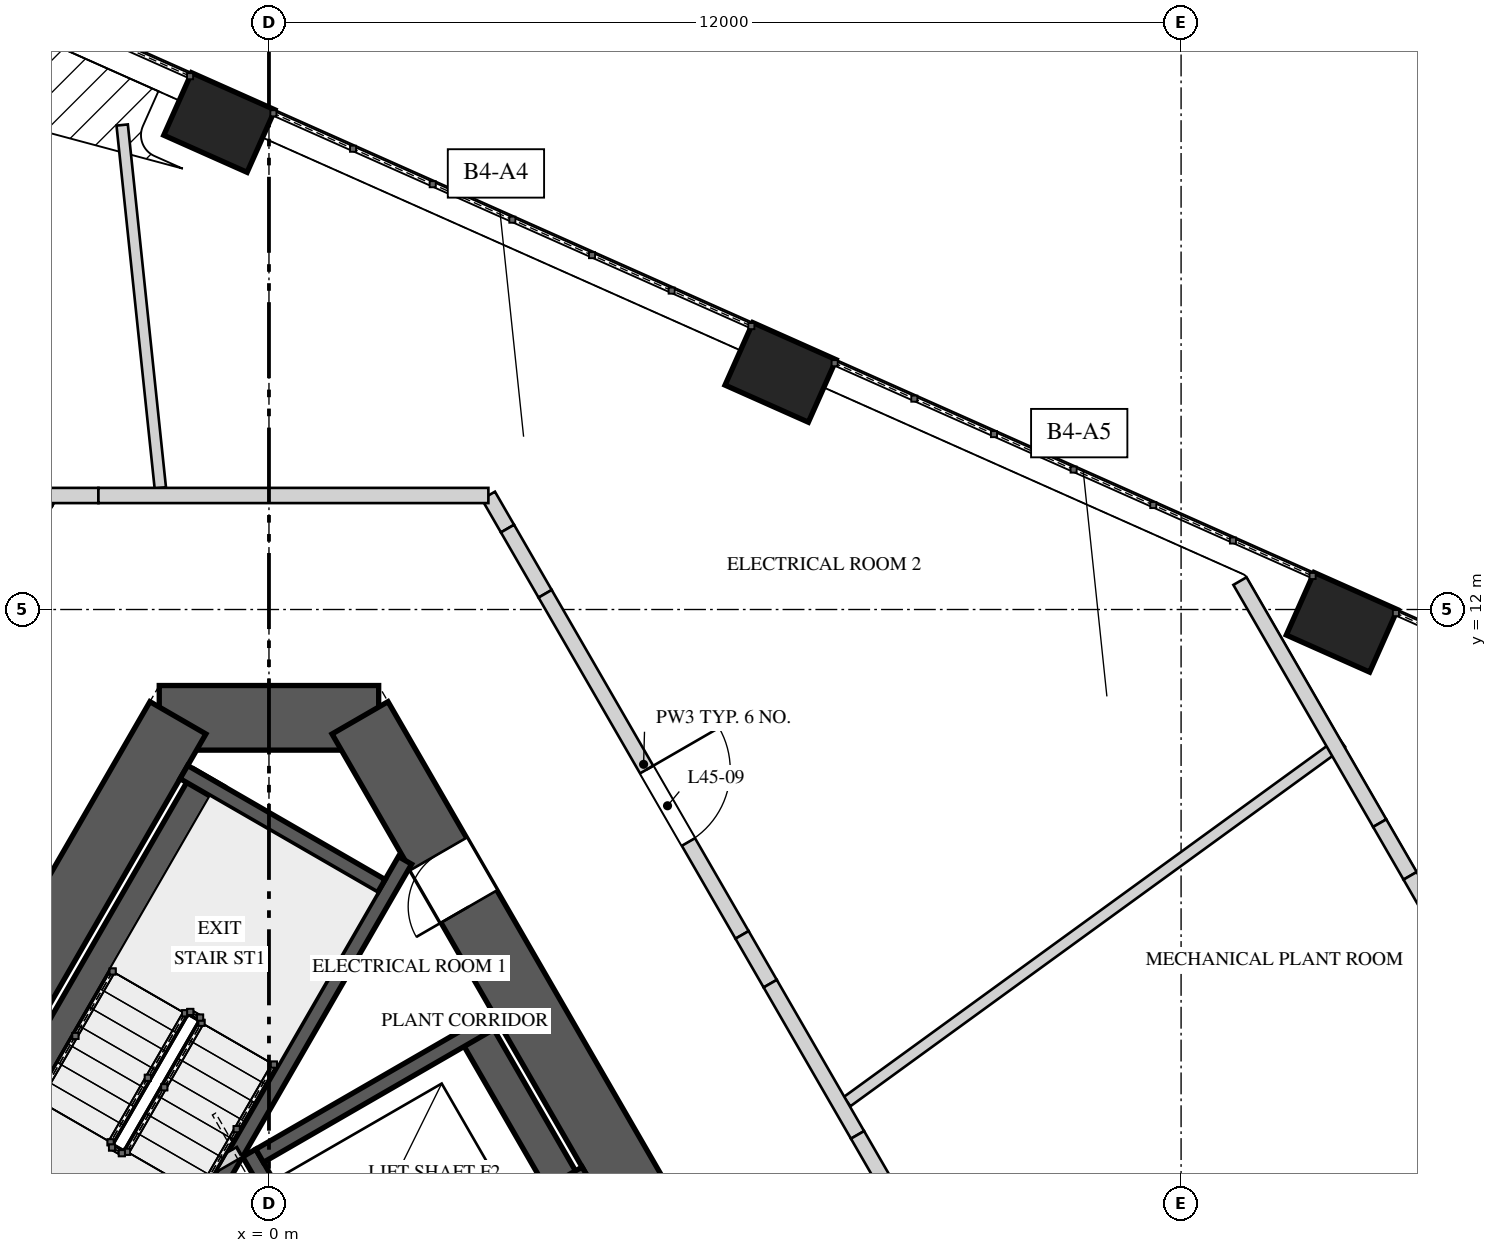
"""IFC4 building model, lengths in metres.
Left out: names, types, materials, properties, quantities, classifications, styles, units other than length and angle.
Written with IfcOpenShell. Run it as: python <this file> out.ifc"""

import sys

from ifc_helpers import new_model, si_unit, direction, frame, frame_2d, origin, origin_2d, place, context, subcontext, project, spatial, rectangle, extrude, element, fill, save


model = new_model("IFC4")
c1 = context("Model", 3, precision=1e-05, world=origin(), true_north=direction((0.0, 1.0)))
c2 = subcontext(c1, "Body", "Model", "MODEL_VIEW")
j1 = project(units=[si_unit("LENGTHUNIT", "METRE"), si_unit("PLANEANGLEUNIT", "RADIAN")], contexts=[c1])
p1 = place(None, origin())
s1 = spatial("IfcSite", under=j1, at=p1, CompositionType="ELEMENT")
p2 = place(p1, origin())
s2 = spatial("IfcBuilding", under=s1, at=p2, CompositionType="ELEMENT")
p3 = place(p2, frame((0.0, 0.0, 194.8)))
s3 = spatial("IfcBuildingStorey", under=s2, at=p3, CompositionType="ELEMENT", Elevation=194.8)
p4 = place(p3, frame((1.443, 10.575, 0.0), z_axis=(0.0, 0.0, 1.0), x_axis=(-1.0, 0.0, 0.0)))
e1 = element("IfcWall", 1, at=p4, inside=s3, PredefinedType="SHEAR", context=c2, shape_type="SweptSolid", body=[
    extrude(rectangle(XDim=2.887, YDim=0.85, at=frame_2d((1.443, 0.0))), origin(), (0.0, 0.0, 1.0), 5.2),
])
p5 = place(p3, frame((-1.198, 10.575, 0.0), z_axis=(0.0, 0.0, 1.0), x_axis=(-0.499995289315, -0.866028123483, 0.0)))
e2 = element("IfcWall", 2, at=p5, inside=s3, PredefinedType="SHEAR", context=c2, shape_type="SweptSolid", body=[
    extrude(rectangle(XDim=17.118, YDim=0.85, at=frame_2d((8.559, 0.0))), origin(), (0.0, 0.0, 1.0), 5.2),
])
p6 = place(p5, frame((6.764, 0.0, 0.0)))
e3 = element("IfcOpeningElement", 3, at=p6, cuts=e2, PredefinedType="OPENING", context=c2, shape_type="SweptSolid", body=[
    extrude(rectangle(XDim=1.0, YDim=2.4, at=frame_2d((0.5, 1.2))), frame((0.0, 0.435, 0.0), z_axis=(0.0, -1.0, 0.0), x_axis=(1.0, 0.0, 0.0)), (0.0, 0.0, 1.0), 0.87),
])
p7 = place(p3, frame((9.757, -4.25, 0.0), z_axis=(0.0, 0.0, 1.0), x_axis=(-0.499995289315, 0.866028123483, 0.0)))
e4 = element("IfcWall", 4, at=p7, inside=s3, PredefinedType="SHEAR", context=c2, shape_type="SweptSolid", body=[
    extrude(rectangle(XDim=17.118, YDim=0.85, at=frame_2d((8.559, 0.0))), origin(), (0.0, 0.0, 1.0), 5.2),
])
p8 = place(p7, frame((6.834, 0.0, 0.0)))
e5 = element("IfcOpeningElement", 5, at=p8, cuts=e4, PredefinedType="OPENING", context=c2, shape_type="SweptSolid", body=[
    extrude(rectangle(XDim=1.0, YDim=2.4, at=frame_2d((0.5, 1.2))), frame((0.0, 0.435, 0.0), z_axis=(0.0, -1.0, 0.0), x_axis=(1.0, 0.0, 0.0)), (0.0, 0.0, 1.0), 0.87),
])
p9 = place(p7, frame((14.252, 0.0, 0.0)))
e6 = element("IfcOpeningElement", 6, at=p9, cuts=e4, PredefinedType="OPENING", context=c2, shape_type="SweptSolid", body=[
    extrude(rectangle(XDim=0.8, YDim=2.1, at=frame_2d((0.4, 1.05))), frame((0.0, 0.435, 0.0), z_axis=(0.0, -1.0, 0.0), x_axis=(1.0, 0.0, 0.0)), (0.0, 0.0, 1.0), 0.87),
])
for number, where, z_axis, x_axis in (
    (7, (14.115, 11.832, 0.0), (0.0, 0.0, 1.0), (-0.914, 0.407, 0.0)),
    (8, (6.731, 15.119, 0.0), (0.0, 0.0, 1.0), (-0.914, 0.407, 0.0)),
    (9, (-0.653, 18.407, 0.0), (0.0, 0.0, 1.0), (-0.914, 0.407, 0.0)),
):
    element("IfcColumn", number, at=place(p3, frame(where, z_axis=z_axis, x_axis=x_axis)), inside=s3, PredefinedType="COLUMN", context=c2, shape_type="SweptSolid", body=[
        extrude(rectangle(XDim=1.2, YDim=0.9, at=origin_2d()), origin(), (0.0, 0.0, 1.0), 2.835),
    ])
p10 = place(p3, frame((-0.788, 9.785, 0.0), z_axis=(0.0, 0.0, 1.0), x_axis=(-0.500009909098, -0.866019682689, 0.0)))
e10 = element("IfcWall", 10, at=p10, inside=s3, PredefinedType="SOLIDWALL", context=c2, shape_type="SweptSolid", body=[
    extrude(rectangle(XDim=6.2, YDim=0.45, at=frame_2d((3.1, 0.0))), origin(), (0.0, 0.0, 1.0), 4.85),
])
p11 = place(p3, frame((1.79, 8.7, 0.0), z_axis=(0.0, 0.0, 1.0), x_axis=(-0.499999959354, -0.866025427251, 0.0)))
e11 = element("IfcWall", 11, at=p11, inside=s3, PredefinedType="SOLIDWALL", context=c2, shape_type="SweptSolid", body=[
    extrude(rectangle(XDim=6.549, YDim=0.2, at=frame_2d((3.275, 0.0))), origin(), (0.0, 0.0, 1.0), 4.85),
])
p12 = place(p3, frame((1.479, 8.361, 0.0), z_axis=(0.0, 0.0, 1.0), x_axis=(-0.866031096941, 0.499990139034, 0.0)))
e12 = element("IfcWall", 12, at=p12, inside=s3, PredefinedType="SOLIDWALL", context=c2, shape_type="SweptSolid", body=[
    extrude(rectangle(XDim=3.0, YDim=0.2, at=frame_2d((1.5, 0.0))), origin(), (0.0, 0.0, 1.0), 4.85),
])
p13 = place(p3, frame((-1.521, 3.165, 0.0), z_axis=(0.0, 0.0, 1.0), x_axis=(-0.866031096941, 0.499990139034, 0.0)))
e13 = element("IfcWall", 13, at=p13, inside=s3, PredefinedType="SOLIDWALL", context=c2, shape_type="SweptSolid", body=[
    extrude(rectangle(XDim=3.0, YDim=0.2, at=frame_2d((1.5, 0.0))), origin(), (0.0, 0.0, 1.0), 4.85),
])
p14 = place(p13, frame((0.725, 0.0, 0.0)))
e14 = element("IfcOpeningElement", 14, at=p14, cuts=e13, PredefinedType="OPENING", context=c2, shape_type="SweptSolid", body=[
    extrude(rectangle(XDim=1.1, YDim=2.4, at=frame_2d((0.55, 1.2))), frame((0.0, 0.11, 0.0), z_axis=(0.0, -1.0, 0.0), x_axis=(1.0, 0.0, 0.0)), (0.0, 0.0, 1.0), 0.22),
])
p15 = place(p3, frame((2.19, 0.606, 0.0), z_axis=(0.0, 0.0, 1.0), x_axis=(-0.500002801628, 0.866023786258, 0.0)))
e15 = element("IfcWall", 15, at=p15, inside=s3, PredefinedType="SOLIDWALL", context=c2, shape_type="SweptSolid", body=[
    extrude(rectangle(XDim=4.9, YDim=0.2, at=frame_2d((2.45, 0.0))), origin(), (0.0, 0.0, 1.0), 4.85),
])
p16 = place(p15, frame((0.625, 0.0, 0.0)))
e16 = element("IfcOpeningElement", 16, at=p16, cuts=e15, PredefinedType="OPENING", context=c2, shape_type="SweptSolid", body=[
    extrude(rectangle(XDim=1.3, YDim=2.1, at=frame_2d((0.65, 1.05))), frame((0.0, 0.11, 0.0), z_axis=(0.0, -1.0, 0.0), x_axis=(1.0, 0.0, 0.0)), (0.0, 0.0, 1.0), 0.22),
])
p17 = place(p15, frame((2.975, 0.0, 0.0)))
e17 = element("IfcOpeningElement", 17, at=p17, cuts=e15, PredefinedType="OPENING", context=c2, shape_type="SweptSolid", body=[
    extrude(rectangle(XDim=1.3, YDim=2.1, at=frame_2d((0.65, 1.05))), frame((0.0, 0.11, 0.0), z_axis=(0.0, -1.0, 0.0), x_axis=(1.0, 0.0, 0.0)), (0.0, 0.0, 1.0), 0.22),
])
p18 = place(p3, frame((5.113, 2.294, 0.0), z_axis=(0.0, 0.0, 1.0), x_axis=(-0.500002801628, 0.866023786258, 0.0)))
e18 = element("IfcWall", 18, at=p18, inside=s3, PredefinedType="SOLIDWALL", context=c2, shape_type="SweptSolid", body=[
    extrude(rectangle(XDim=4.9, YDim=0.45, at=frame_2d((2.45, 0.0))), origin(), (0.0, 0.0, 1.0), 4.85),
])
for number, where, z_axis, x_axis in (
    (19, (1.052, 2.778, 0.0), (0.0, 0.0, 1.0), (0.866, 0.5, 0.0)),
    (20, (-0.123, 4.813, 0.0), (0.0, 0.0, 1.0), (0.866, 0.5, 0.0)),
):
    element("IfcWall", number, at=place(p3, frame(where, z_axis=z_axis, x_axis=x_axis)), inside=s3, PredefinedType="SOLIDWALL", context=c2, shape_type="SweptSolid", body=[
        extrude(rectangle(XDim=3.6, YDim=0.2, at=frame_2d((1.8, 0.0))), origin(), (0.0, 0.0, 1.0), 4.85),
    ])
p19 = place(p3, frame((-1.51, 4.215, 0.0), z_axis=(0.0, 0.0, 1.0), x_axis=(0.866085525409, 0.49989585183, 0.0)))
e21 = element("IfcWall", 21, at=p19, inside=s3, PredefinedType="PARTITIONING", context=c2, shape_type="SweptSolid", body=[
    extrude(rectangle(XDim=1.3, YDim=0.15, at=frame_2d((0.65, 0.0))), origin(), (0.0, 0.0, 1.0), 4.85),
])
p20 = place(p3, frame((-1.931, 18.374, 0.0), z_axis=(0.0, 0.0, 1.0), x_axis=(0.104517989015, -0.994522996201, 0.0)))
e22 = element("IfcWall", 22, at=p20, inside=s3, PredefinedType="PARTITIONING", context=c2, shape_type="SweptSolid", body=[
    extrude(rectangle(XDim=4.8, YDim=0.15, at=frame_2d((2.4, 0.0))), origin(), (0.0, 0.0, 1.0), 4.85),
])
p21 = place(p3, frame((7.606, 5.526, 0.0), z_axis=(0.0, 0.0, 1.0), x_axis=(0.809027351465, 0.587770996717, 0.0)))
e23 = element("IfcWall", 23, at=p21, inside=s3, PredefinedType="PARTITIONING", context=c2, shape_type="SweptSolid", body=[
    extrude(rectangle(XDim=8.044, YDim=0.15, at=frame_2d((4.022, 0.0))), origin(), (0.0, 0.0, 1.0), 4.85),
])
p22 = place(p3, frame((2.887, 13.5, 0.0), z_axis=(0.0, 0.0, 1.0), x_axis=(0.500002592159, -0.866023907196, 0.0)))
e24 = element("IfcWall", 24, at=p22, inside=s3, PredefinedType="SOLIDWALL", context=c2, shape_type="SweptSolid", body=[
    extrude(rectangle(XDim=0.503, YDim=0.2, at=frame_2d((0.251, 0.0))), origin(), (0.0, 0.0, 1.0), 4.85),
])
p23 = place(p3, frame((3.138, 13.064, 0.0), z_axis=(0.0, 0.0, 1.0), x_axis=(0.500063959222, -0.865988473761, 0.0)))
e25 = element("IfcWall", 25, at=p23, inside=s3, PredefinedType="SOLIDWALL", context=c2, shape_type="SweptSolid", body=[
    extrude(rectangle(XDim=0.99, YDim=0.2, at=frame_2d((0.495, 0.0))), origin(), (0.0, 0.0, 1.0), 4.15),
])
p24 = place(p3, frame((3.633, 12.207, 0.0), z_axis=(0.0, 0.0, 1.0), x_axis=(0.499990271856, -0.866031020258, 0.0)))
e26 = element("IfcWall", 26, at=p24, inside=s3, PredefinedType="SOLIDWALL", context=c2, shape_type="SweptSolid", body=[
    extrude(rectangle(XDim=5.182, YDim=0.2, at=frame_2d((2.591, 0.0))), origin(), (0.0, 0.0, 1.0), 4.85),
])
p25 = place(p24, frame((2.671, 0.0, 0.0)))
e27 = element("IfcOpeningElement", 27, at=p25, cuts=e26, PredefinedType="OPENING", context=c2, shape_type="SweptSolid", body=[
    extrude(rectangle(XDim=1.1, YDim=2.2, at=frame_2d((0.55, 1.1))), frame((0.0, 0.11, 0.0), z_axis=(0.0, -1.0, 0.0), x_axis=(1.0, 0.0, 0.0)), (0.0, 0.0, 1.0), 0.22),
])
p26 = place(p3, frame((6.224, 7.719, 0.0), z_axis=(0.0, 0.0, 1.0), x_axis=(0.499931655587, -0.866064858854, 0.0)))
e28 = element("IfcWall", 28, at=p26, inside=s3, PredefinedType="SOLIDWALL", context=c2, shape_type="SweptSolid", body=[
    extrude(rectangle(XDim=0.741, YDim=0.2, at=frame_2d((0.37, 0.0))), origin(), (0.0, 0.0, 1.0), 4.15),
])
p27 = place(p3, frame((6.594, 7.078, 0.0), z_axis=(0.0, 0.0, 1.0), x_axis=(0.500013761451, -0.866017458461, 0.0)))
e29 = element("IfcWall", 29, at=p27, inside=s3, PredefinedType="SOLIDWALL", context=c2, shape_type="SweptSolid", body=[
    extrude(rectangle(XDim=2.297, YDim=0.2, at=frame_2d((1.149, 0.0))), origin(), (0.0, 0.0, 1.0), 4.85),
])
p28 = place(p3, frame((7.743, 5.088, 0.0), z_axis=(0.0, 0.0, 1.0), x_axis=(0.500109828528, -0.865961984968, 0.0)))
e30 = element("IfcWall", 30, at=p28, inside=s3, PredefinedType="SOLIDWALL", context=c2, shape_type="SweptSolid", body=[
    extrude(rectangle(XDim=0.8, YDim=0.2, at=frame_2d((0.4, 0.0))), origin(), (0.0, 0.0, 1.0), 3.95),
])
p29 = place(p3, frame((-2.939, 13.409, 0.0), z_axis=(0.0, 0.0, 1.0), x_axis=(0.500393920955, 0.865797853931, 0.0)))
e31 = element("IfcWall", 31, at=p29, inside=s3, PredefinedType="SOLIDWALL", context=c2, shape_type="SweptSolid", body=[
    extrude(rectangle(XDim=0.105, YDim=0.2, at=frame_2d((0.052, 0.0))), origin(), (0.0, 0.0, 1.0), 4.15),
])
p30 = place(p3, frame((-2.887, 13.5, 0.0), z_axis=(0.0, 0.0, 1.0), x_axis=(1.0, 0.0, 0.0)))
e32 = element("IfcWall", 32, at=p30, inside=s3, PredefinedType="SOLIDWALL", context=c2, shape_type="SweptSolid", body=[
    extrude(rectangle(XDim=0.643, YDim=0.2, at=frame_2d((0.321, 0.0))), origin(), (0.0, 0.0, 1.0), 4.15),
])
p31 = place(p3, frame((-2.244, 13.5, 0.0), z_axis=(0.0, 0.0, 1.0), x_axis=(1.0, 0.0, 0.0)))
e33 = element("IfcWall", 33, at=p31, inside=s3, PredefinedType="SOLIDWALL", context=c2, shape_type="SweptSolid", body=[
    extrude(rectangle(XDim=5.131, YDim=0.2, at=frame_2d((2.565, 0.0))), origin(), (0.0, 0.0, 1.0), 4.85),
])
p32 = place(p3, frame((12.774, 12.374, 0.0), z_axis=(0.0, 0.0, 1.0), x_axis=(0.500002145574, -0.866024165033, 0.0)))
e34 = element("IfcWall", 34, at=p32, inside=s3, PredefinedType="SOLIDWALL", context=c2, shape_type="SweptSolid", body=[
    extrude(rectangle(XDim=3.677, YDim=0.2, at=frame_2d((1.839, 0.0))), origin(), (0.0, 0.0, 1.0), 4.85),
])
p33 = place(p3, frame((14.613, 9.189, 0.0), z_axis=(0.0, 0.0, 1.0), x_axis=(0.500109828528, -0.865961984968, 0.0)))
e35 = element("IfcWall", 35, at=p33, inside=s3, PredefinedType="SOLIDWALL", context=c2, shape_type="SweptSolid", body=[
    extrude(rectangle(XDim=0.8, YDim=0.2, at=frame_2d((0.4, 0.0))), origin(), (0.0, 0.0, 1.0), 3.95),
])
p34 = place(p3, frame((15.013, 8.497, 0.0), z_axis=(0.0, 0.0, 1.0), x_axis=(0.499981435953, -0.866036121476, 0.0)))
e36 = element("IfcWall", 36, at=p34, inside=s3, PredefinedType="SOLIDWALL", context=c2, shape_type="SweptSolid", body=[
    extrude(rectangle(XDim=9.683, YDim=0.2, at=frame_2d((4.842, 0.0))), origin(), (0.0, 0.0, 1.0), 4.85),
])
p35 = place(p9, origin())
e37 = element("IfcDoor", 37, at=p35, inside=s3, OperationType="SINGLE_SWING_RIGHT", PredefinedType="DOOR", context=c2, shape_type="SweptSolid", body=[
    extrude(rectangle(XDim=0.8, YDim=2.1, at=frame_2d((0.4, 1.05))), frame((0.0, 0.025, 0.0), z_axis=(0.0, -1.0, 0.0), x_axis=(1.0, 0.0, 0.0)), (0.0, 0.0, 1.0), 0.05),
])
fill(e6, e37)
p36 = place(p25, origin())
e38 = element("IfcDoor", 38, at=p36, inside=s3, OperationType="SINGLE_SWING_LEFT", PredefinedType="DOOR", context=c2, shape_type="SweptSolid", body=[
    extrude(rectangle(XDim=1.1, YDim=2.2, at=frame_2d((0.55, 1.1))), frame((0.0, 0.025, 0.0), z_axis=(0.0, -1.0, 0.0), x_axis=(1.0, 0.0, 0.0)), (0.0, 0.0, 1.0), 0.05),
])
fill(e27, e38)
save(model, sys.argv[1])
